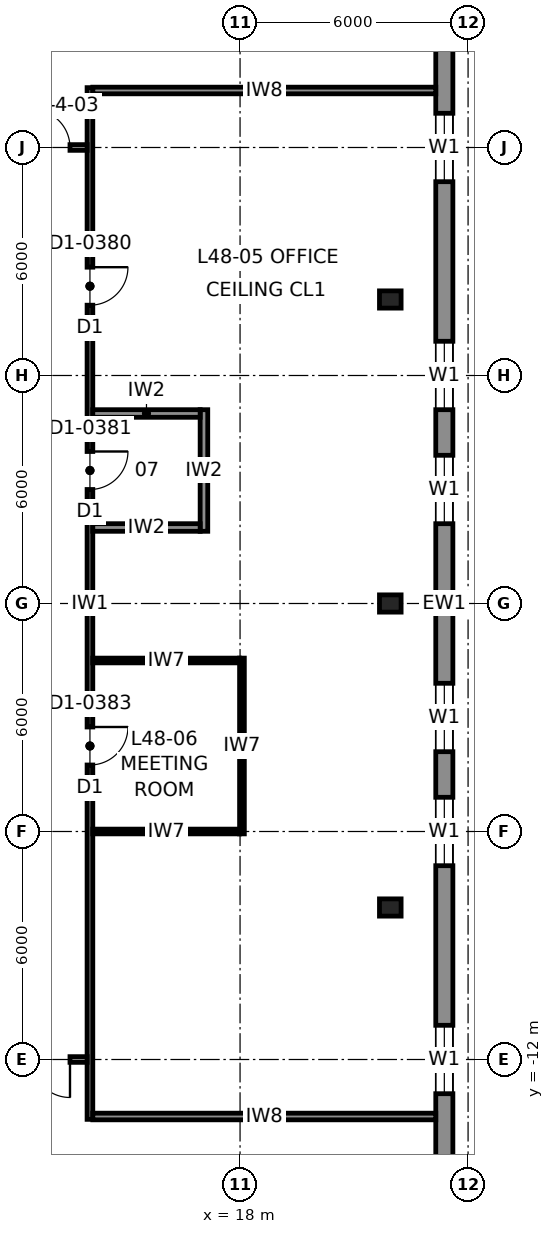
"""IFC4 building model, lengths in metres.
Left out: names, types, materials, properties, quantities, classifications, styles, units other than length and angle.
Written with IfcOpenShell. Run it as: python <this file> out.ifc"""

import sys

from ifc_helpers import new_model, si_unit, direction, frame, frame_2d, origin, origin_2d, place, context, subcontext, project, spatial, rectangle, i_section, extrude, element, fill, save


model = new_model("IFC4")
c1 = context("Model", 3, precision=1e-05, world=origin(), true_north=direction((0.0, 1.0)))
c2 = subcontext(c1, "Body", "Model", "MODEL_VIEW")
j1 = project(units=[si_unit("LENGTHUNIT", "METRE"), si_unit("PLANEANGLEUNIT", "RADIAN")], contexts=[c1])
p1 = place(None, origin())
s1 = spatial("IfcSite", under=j1, at=p1, CompositionType="ELEMENT")
p2 = place(p1, origin())
s2 = spatial("IfcBuilding", under=s1, at=p2, CompositionType="ELEMENT")
p3 = place(p2, frame((0.0, 0.0, 221.8)))
s3 = spatial("IfcBuildingStorey", under=s2, at=p3, CompositionType="ELEMENT", Elevation=221.8)
for number, where, z_axis, x_axis in (
    (1, (21.953, 0.0, 0.0), (-0.04, 0.0, 0.999), (0.0, -1.0, 0.0)),
    (2, (21.953, -8.0, 0.0), (-0.04, 0.0, 0.999), (0.0, -1.0, 0.0)),
    (3, (21.953, 8.0, 0.0), (-0.04, 0.0, 0.999), (0.0, -1.0, 0.0)),
):
    element("IfcColumn", number, at=place(p3, frame(where, z_axis=z_axis, x_axis=x_axis)), inside=s3, PredefinedType="COLUMN", context=c2, shape_type="SweptSolid", body=[
        extrude(i_section(OverallWidth=0.454, OverallDepth=0.569, WebThickness=0.078, FlangeThickness=0.125, at=origin_2d()), origin(), (0.0, 0.0, 1.0), 4.003),
    ])
p4 = place(p3, frame((23.375, -19.1, 0.0), z_axis=(0.0, 0.0, 1.0), x_axis=(0.0, 1.0, 0.0)))
e4 = element("IfcWall", 4, at=p4, inside=s3, PredefinedType="SOLIDWALL", context=c2, shape_type="SweptSolid", body=[
    extrude(rectangle(XDim=38.2, YDim=0.45, at=frame_2d((19.1, 0.0))), origin(), (0.0, 0.0, 1.0), 3.83),
])
p5 = place(p4, frame((6.2, 0.0, 0.7)))
e5 = element("IfcOpeningElement", 5, at=p5, cuts=e4, PredefinedType="OPENING", context=c2, shape_type="SweptSolid", body=[
    extrude(rectangle(XDim=1.8, YDim=2.6, at=frame_2d((0.9, 1.3))), frame((0.0, 0.235, 0.0), z_axis=(0.0, -1.0, 0.0), x_axis=(1.0, 0.0, 0.0)), (0.0, 0.0, 1.0), 0.47),
])
p6 = place(p4, frame((12.2, 0.0, 0.7)))
e6 = element("IfcOpeningElement", 6, at=p6, cuts=e4, PredefinedType="OPENING", context=c2, shape_type="SweptSolid", body=[
    extrude(rectangle(XDim=1.8, YDim=2.6, at=frame_2d((0.9, 1.3))), frame((0.0, 0.235, 0.0), z_axis=(0.0, -1.0, 0.0), x_axis=(1.0, 0.0, 0.0)), (0.0, 0.0, 1.0), 0.47),
])
p7 = place(p4, frame((15.2, 0.0, 0.7)))
e7 = element("IfcOpeningElement", 7, at=p7, cuts=e4, PredefinedType="OPENING", context=c2, shape_type="SweptSolid", body=[
    extrude(rectangle(XDim=1.8, YDim=2.6, at=frame_2d((0.9, 1.3))), frame((0.0, 0.235, 0.0), z_axis=(0.0, -1.0, 0.0), x_axis=(1.0, 0.0, 0.0)), (0.0, 0.0, 1.0), 0.47),
])
p8 = place(p4, frame((21.2, 0.0, 0.7)))
e8 = element("IfcOpeningElement", 8, at=p8, cuts=e4, PredefinedType="OPENING", context=c2, shape_type="SweptSolid", body=[
    extrude(rectangle(XDim=1.8, YDim=2.6, at=frame_2d((0.9, 1.3))), frame((0.0, 0.235, 0.0), z_axis=(0.0, -1.0, 0.0), x_axis=(1.0, 0.0, 0.0)), (0.0, 0.0, 1.0), 0.47),
])
p9 = place(p4, frame((24.2, 0.0, 0.7)))
e9 = element("IfcOpeningElement", 9, at=p9, cuts=e4, PredefinedType="OPENING", context=c2, shape_type="SweptSolid", body=[
    extrude(rectangle(XDim=1.8, YDim=2.6, at=frame_2d((0.9, 1.3))), frame((0.0, 0.235, 0.0), z_axis=(0.0, -1.0, 0.0), x_axis=(1.0, 0.0, 0.0)), (0.0, 0.0, 1.0), 0.47),
])
p10 = place(p4, frame((30.2, 0.0, 0.7)))
e10 = element("IfcOpeningElement", 10, at=p10, cuts=e4, PredefinedType="OPENING", context=c2, shape_type="SweptSolid", body=[
    extrude(rectangle(XDim=1.8, YDim=2.6, at=frame_2d((0.9, 1.3))), frame((0.0, 0.235, 0.0), z_axis=(0.0, -1.0, 0.0), x_axis=(1.0, 0.0, 0.0)), (0.0, 0.0, 1.0), 0.47),
])
p11 = place(p3, frame((14.05, -13.575, 0.0), z_axis=(0.0, 0.0, 1.0), x_axis=(0.0, 1.0, 0.0)))
e11 = element("IfcWall", 11, at=p11, inside=s3, PredefinedType="PARTITIONING", context=c2, shape_type="SweptSolid", body=[
    extrude(rectangle(XDim=27.15, YDim=0.15, at=frame_2d((13.575, 0.0))), origin(), (0.0, 0.0, 1.0), 3.83),
])
p12 = place(p11, frame((21.425, 0.0, 0.0)))
e12 = element("IfcOpeningElement", 12, at=p12, cuts=e11, PredefinedType="OPENING", context=c2, shape_type="SweptSolid", body=[
    extrude(rectangle(XDim=1.0, YDim=2.3, at=frame_2d((0.5, 1.15))), frame((0.0, 0.085, 0.0), z_axis=(0.0, -1.0, 0.0), x_axis=(1.0, 0.0, 0.0)), (0.0, 0.0, 1.0), 0.17),
])
p13 = place(p11, frame((9.325, 0.0, 0.0)))
e13 = element("IfcOpeningElement", 13, at=p13, cuts=e11, PredefinedType="OPENING", context=c2, shape_type="SweptSolid", body=[
    extrude(rectangle(XDim=1.0, YDim=2.3, at=frame_2d((0.5, 1.15))), frame((0.0, 0.085, 0.0), z_axis=(0.0, -1.0, 0.0), x_axis=(1.0, 0.0, 0.0)), (0.0, 0.0, 1.0), 0.17),
])
p14 = place(p11, frame((16.575, 0.0, 0.0)))
e14 = element("IfcOpeningElement", 14, at=p14, cuts=e11, PredefinedType="OPENING", context=c2, shape_type="SweptSolid", body=[
    extrude(rectangle(XDim=1.0, YDim=2.3, at=frame_2d((0.5, 1.15))), frame((0.0, 0.085, 0.0), z_axis=(0.0, -1.0, 0.0), x_axis=(1.0, 0.0, 0.0)), (0.0, 0.0, 1.0), 0.17),
])
p15 = place(p3, frame((12.0, 12.0, 0.0), z_axis=(0.0, 0.0, 1.0), x_axis=(1.0, 0.0, 0.0)))
e15 = element("IfcWall", 15, at=p15, inside=s3, PredefinedType="PARTITIONING", context=c2, shape_type="SweptSolid", body=[
    extrude(rectangle(XDim=1.975, YDim=0.15, at=frame_2d((0.988, 0.0))), origin(), (0.0, 0.0, 1.0), 3.83),
])
p16 = place(p15, frame((0.525, 0.0, 0.0)))
e16 = element("IfcOpeningElement", 16, at=p16, cuts=e15, PredefinedType="OPENING", context=c2, shape_type="SweptSolid", body=[
    extrude(rectangle(XDim=1.0, YDim=2.3, at=frame_2d((0.5, 1.15))), frame((0.0, 0.085, 0.0), z_axis=(0.0, -1.0, 0.0), x_axis=(1.0, 0.0, 0.0)), (0.0, 0.0, 1.0), 0.17),
])
p17 = place(p3, frame((13.975, -12.0, 0.0), z_axis=(0.0, 0.0, 1.0), x_axis=(-1.0, 0.0, 0.0)))
e17 = element("IfcWall", 17, at=p17, inside=s3, PredefinedType="PARTITIONING", context=c2, shape_type="SweptSolid", body=[
    extrude(rectangle(XDim=1.975, YDim=0.15, at=frame_2d((0.988, 0.0))), origin(), (0.0, 0.0, 1.0), 3.83),
])
p18 = place(p17, frame((0.45, 0.0, 0.0)))
e18 = element("IfcOpeningElement", 18, at=p18, cuts=e17, PredefinedType="OPENING", context=c2, shape_type="SweptSolid", body=[
    extrude(rectangle(XDim=1.0, YDim=2.3, at=frame_2d((0.5, 1.15))), frame((0.0, 0.085, 0.0), z_axis=(0.0, -1.0, 0.0), x_axis=(1.0, 0.0, 0.0)), (0.0, 0.0, 1.0), 0.17),
])
for number, where, z_axis, x_axis in (
    (19, (14.125, 13.5, 0.0), (0.0, 0.0, 1.0), (1.0, 0.0, 0.0)),
    (20, (23.15, -13.5, 0.0), (0.0, 0.0, 1.0), (-1.0, 0.0, 0.0)),
):
    element("IfcWall", number, at=place(p3, frame(where, z_axis=z_axis, x_axis=x_axis)), inside=s3, PredefinedType="PARTITIONING", context=c2, shape_type="SweptSolid", body=[
        extrude(rectangle(XDim=9.025, YDim=0.175, at=frame_2d((4.512, 0.0))), origin(), (0.0, 0.0, 1.0), 3.83),
    ])
p19 = place(p3, frame((18.05, -6.062, 0.0), z_axis=(0.0, 0.0, 1.0), x_axis=(0.0, 1.0, 0.0)))
e21 = element("IfcWall", 21, at=p19, inside=s3, PredefinedType="PARTITIONING", context=c2, shape_type="SweptSolid", body=[
    extrude(rectangle(XDim=4.625, YDim=0.125, at=frame_2d((2.312, 0.0))), origin(), (0.0, 0.0, 1.0), 3.83),
])
for number, where, z_axis, x_axis in (
    (22, (14.125, -6.0, 0.0), (0.0, 0.0, 1.0), (1.0, 0.0, 0.0)),
    (23, (14.125, -1.5, 0.0), (0.0, 0.0, 1.0), (1.0, 0.0, 0.0)),
):
    element("IfcWall", number, at=place(p3, frame(where, z_axis=z_axis, x_axis=x_axis)), inside=s3, PredefinedType="PARTITIONING", context=c2, shape_type="SweptSolid", body=[
        extrude(rectangle(XDim=3.863, YDim=0.125, at=frame_2d((1.931, 0.0))), origin(), (0.0, 0.0, 1.0), 3.83),
    ])
p20 = place(p3, frame((17.05, 1.9, 0.0), z_axis=(0.0, 0.0, 1.0), x_axis=(0.0, 1.0, 0.0)))
e24 = element("IfcWall", 24, at=p20, inside=s3, PredefinedType="PARTITIONING", context=c2, shape_type="SweptSolid", body=[
    extrude(rectangle(XDim=3.2, YDim=0.2, at=frame_2d((1.6, 0.0))), origin(), (0.0, 0.0, 1.0), 3.83),
])
for number, where, z_axis, x_axis in (
    (25, (14.125, 2.0, 0.0), (0.0, 0.0, 1.0), (1.0, 0.0, 0.0)),
    (26, (14.125, 5.0, 0.0), (0.0, 0.0, 1.0), (1.0, 0.0, 0.0)),
):
    element("IfcWall", number, at=place(p3, frame(where, z_axis=z_axis, x_axis=x_axis)), inside=s3, PredefinedType="PARTITIONING", context=c2, shape_type="SweptSolid", body=[
        extrude(rectangle(XDim=2.825, YDim=0.2, at=frame_2d((1.413, 0.0))), origin(), (0.0, 0.0, 1.0), 3.83),
    ])
p21 = place(p5, origin())
e27 = element("IfcWindow", 27, at=p21, inside=s3, PartitioningType="SINGLE_PANEL", PredefinedType="WINDOW", context=c2, shape_type="SweptSolid", body=[
    extrude(rectangle(XDim=1.8, YDim=2.6, at=frame_2d((0.9, 1.3))), frame((0.0, 0.03, 0.0), z_axis=(0.0, -1.0, 0.0), x_axis=(1.0, 0.0, 0.0)), (0.0, 0.0, 1.0), 0.06),
])
fill(e5, e27)
p22 = place(p6, origin())
e28 = element("IfcWindow", 28, at=p22, inside=s3, PartitioningType="SINGLE_PANEL", PredefinedType="WINDOW", context=c2, shape_type="SweptSolid", body=[
    extrude(rectangle(XDim=1.8, YDim=2.6, at=frame_2d((0.9, 1.3))), frame((0.0, 0.03, 0.0), z_axis=(0.0, -1.0, 0.0), x_axis=(1.0, 0.0, 0.0)), (0.0, 0.0, 1.0), 0.06),
])
fill(e6, e28)
p23 = place(p7, origin())
e29 = element("IfcWindow", 29, at=p23, inside=s3, PartitioningType="SINGLE_PANEL", PredefinedType="WINDOW", context=c2, shape_type="SweptSolid", body=[
    extrude(rectangle(XDim=1.8, YDim=2.6, at=frame_2d((0.9, 1.3))), frame((0.0, 0.03, 0.0), z_axis=(0.0, -1.0, 0.0), x_axis=(1.0, 0.0, 0.0)), (0.0, 0.0, 1.0), 0.06),
])
fill(e7, e29)
p24 = place(p8, origin())
e30 = element("IfcWindow", 30, at=p24, inside=s3, PartitioningType="SINGLE_PANEL", PredefinedType="WINDOW", context=c2, shape_type="SweptSolid", body=[
    extrude(rectangle(XDim=1.8, YDim=2.6, at=frame_2d((0.9, 1.3))), frame((0.0, 0.03, 0.0), z_axis=(0.0, -1.0, 0.0), x_axis=(1.0, 0.0, 0.0)), (0.0, 0.0, 1.0), 0.06),
])
fill(e8, e30)
p25 = place(p9, origin())
e31 = element("IfcWindow", 31, at=p25, inside=s3, PartitioningType="SINGLE_PANEL", PredefinedType="WINDOW", context=c2, shape_type="SweptSolid", body=[
    extrude(rectangle(XDim=1.8, YDim=2.6, at=frame_2d((0.9, 1.3))), frame((0.0, 0.03, 0.0), z_axis=(0.0, -1.0, 0.0), x_axis=(1.0, 0.0, 0.0)), (0.0, 0.0, 1.0), 0.06),
])
fill(e9, e31)
p26 = place(p10, origin())
e32 = element("IfcWindow", 32, at=p26, inside=s3, PartitioningType="SINGLE_PANEL", PredefinedType="WINDOW", context=c2, shape_type="SweptSolid", body=[
    extrude(rectangle(XDim=1.8, YDim=2.6, at=frame_2d((0.9, 1.3))), frame((0.0, 0.03, 0.0), z_axis=(0.0, -1.0, 0.0), x_axis=(1.0, 0.0, 0.0)), (0.0, 0.0, 1.0), 0.06),
])
fill(e10, e32)
p27 = place(p16, origin())
e33 = element("IfcDoor", 33, at=p27, inside=s3, OperationType="SINGLE_SWING_LEFT", PredefinedType="DOOR", context=c2, shape_type="SweptSolid", body=[
    extrude(rectangle(XDim=1.0, YDim=2.3, at=frame_2d((0.5, 1.15))), frame((0.0, 0.025, 0.0), z_axis=(0.0, -1.0, 0.0), x_axis=(1.0, 0.0, 0.0)), (0.0, 0.0, 1.0), 0.05),
])
fill(e16, e33)
p28 = place(p18, origin())
e34 = element("IfcDoor", 34, at=p28, inside=s3, OperationType="SINGLE_SWING_LEFT", PredefinedType="DOOR", context=c2, shape_type="SweptSolid", body=[
    extrude(rectangle(XDim=1.0, YDim=2.3, at=frame_2d((0.5, 1.15))), frame((0.0, 0.025, 0.0), z_axis=(0.0, -1.0, 0.0), x_axis=(1.0, 0.0, 0.0)), (0.0, 0.0, 1.0), 0.05),
])
fill(e18, e34)
p29 = place(p12, frame((1.0, 0.0, 0.0), z_axis=(0.0, 0.0, 1.0), x_axis=(-1.0, 0.0, 0.0)))
e35 = element("IfcDoor", 35, at=p29, inside=s3, OperationType="SINGLE_SWING_LEFT", PredefinedType="DOOR", context=c2, shape_type="SweptSolid", body=[
    extrude(rectangle(XDim=1.0, YDim=2.3, at=frame_2d((0.5, 1.15))), frame((0.0, 0.025, 0.0), z_axis=(0.0, -1.0, 0.0), x_axis=(1.0, 0.0, 0.0)), (0.0, 0.0, 1.0), 0.05),
])
fill(e12, e35)
p30 = place(p13, frame((1.0, 0.0, 0.0), z_axis=(0.0, 0.0, 1.0), x_axis=(-1.0, 0.0, 0.0)))
e36 = element("IfcDoor", 36, at=p30, inside=s3, OperationType="SINGLE_SWING_LEFT", PredefinedType="DOOR", context=c2, shape_type="SweptSolid", body=[
    extrude(rectangle(XDim=1.0, YDim=2.3, at=frame_2d((0.5, 1.15))), frame((0.0, 0.025, 0.0), z_axis=(0.0, -1.0, 0.0), x_axis=(1.0, 0.0, 0.0)), (0.0, 0.0, 1.0), 0.05),
])
fill(e13, e36)
p31 = place(p14, frame((1.0, 0.0, 0.0), z_axis=(0.0, 0.0, 1.0), x_axis=(-1.0, 0.0, 0.0)))
e37 = element("IfcDoor", 37, at=p31, inside=s3, OperationType="SINGLE_SWING_LEFT", PredefinedType="DOOR", context=c2, shape_type="SweptSolid", body=[
    extrude(rectangle(XDim=1.0, YDim=2.3, at=frame_2d((0.5, 1.15))), frame((0.0, 0.025, 0.0), z_axis=(0.0, -1.0, 0.0), x_axis=(1.0, 0.0, 0.0)), (0.0, 0.0, 1.0), 0.05),
])
fill(e14, e37)
save(model, sys.argv[1])
